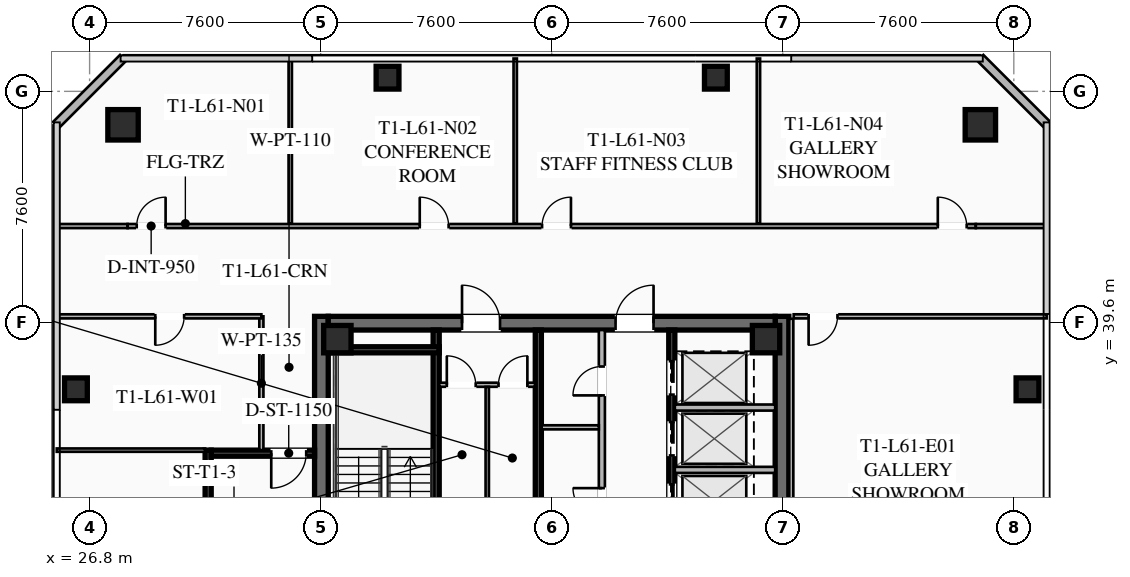
"""IFC4 building model, lengths in metres.
Left out: names, types, materials, properties, quantities, classifications, styles, units other than length and angle.
Written with IfcOpenShell. Run it as: python <this file> out.ifc"""

import sys

from ifc_helpers import new_model, si_unit, direction, frame, frame_2d, origin, origin_2d, place, context, subcontext, project, spatial, rectangle, hollow_rectangle, extrude, element, fill, save


model = new_model("IFC4")
c1 = context("Model", 3, precision=1e-05, world=origin(), true_north=direction((0.0, 1.0)))
c2 = subcontext(c1, "Body", "Model", "MODEL_VIEW")
j1 = project(units=[si_unit("LENGTHUNIT", "METRE"), si_unit("PLANEANGLEUNIT", "RADIAN")], contexts=[c1])
p1 = place(None, origin())
s1 = spatial("IfcSite", under=j1, at=p1, CompositionType="ELEMENT")
p2 = place(p1, origin())
s2 = spatial("IfcBuilding", under=s1, at=p2, CompositionType="ELEMENT")
p3 = place(p2, frame((0.0, 0.0, 225.5)))
s3 = spatial("IfcBuildingStorey", under=s2, at=p3, CompositionType="ELEMENT", Elevation=225.5)
for number, where, z_axis, x_axis in (
    (1, (34.425, 24.2, 0.0), (0.0, 0.0, 1.0), (0.0, 1.0, 0.0)),
    (2, (49.575, 39.8, 0.0), (0.0, 0.0, 1.0), (0.0, -1.0, 0.0)),
):
    element("IfcWall", number, at=place(p3, frame(where, z_axis=z_axis, x_axis=x_axis)), inside=s3, PredefinedType="SHEAR", context=c2, shape_type="SweptSolid", body=[
        extrude(rectangle(XDim=15.6, YDim=0.45, at=frame_2d((7.8, 0.0))), origin(), (0.0, 0.0, 1.0), 3.55),
    ])
p4 = place(p3, frame((34.65, 39.575, 0.0), z_axis=(0.0, 0.0, 1.0), x_axis=(1.0, 0.0, 0.0)))
e3 = element("IfcWall", 3, at=p4, inside=s3, PredefinedType="SHEAR", context=c2, shape_type="SweptSolid", body=[
    extrude(rectangle(XDim=14.7, YDim=0.45, at=frame_2d((7.35, 0.0))), origin(), (0.0, 0.0, 1.0), 3.55),
])
p5 = place(p4, frame((4.4, 0.0, 0.0)))
e4 = element("IfcOpeningElement", 4, at=p5, cuts=e3, PredefinedType="OPENING", context=c2, shape_type="SweptSolid", body=[
    extrude(rectangle(XDim=1.25, YDim=2.25, at=frame_2d((0.625, 1.125))), frame((0.0, 0.235, 0.0), z_axis=(0.0, -1.0, 0.0), x_axis=(1.0, 0.0, 0.0)), (0.0, 0.0, 1.0), 0.47),
])
p6 = place(p4, frame((9.45, 0.0, 0.0)))
e5 = element("IfcOpeningElement", 5, at=p6, cuts=e3, PredefinedType="OPENING", context=c2, shape_type="SweptSolid", body=[
    extrude(rectangle(XDim=1.25, YDim=2.25, at=frame_2d((0.625, 1.125))), frame((0.0, 0.235, 0.0), z_axis=(0.0, -1.0, 0.0), x_axis=(1.0, 0.0, 0.0)), (0.0, 0.0, 1.0), 0.47),
])
for number, where, z_axis, x_axis in (
    (6, (49.05, 39.05, 0.0), (0.0, 0.0, 1.0), (1.0, 0.0, 0.0)),
    (7, (34.95, 39.05, 0.0), (0.0, 0.0, 1.0), (1.0, 0.0, 0.0)),
):
    element("IfcColumn", number, at=place(p3, frame(where, z_axis=z_axis, x_axis=x_axis)), inside=s3, PredefinedType="COLUMN", context=c2, shape_type="SweptSolid", body=[
        extrude(hollow_rectangle(XDim=0.9, YDim=0.9, WallThickness=0.04, at=origin_2d()), origin(), (0.0, 0.0, 1.0), 3.37),
    ])
for number, where, z_axis, x_axis in (
    (8, (56.1, 46.1, 0.0), (0.0, 0.0, 1.0), (1.0, 0.0, 0.0)),
    (9, (27.9, 46.1, 0.0), (0.0, 0.0, 1.0), (1.0, 0.0, 0.0)),
):
    element("IfcColumn", number, at=place(p3, frame(where, z_axis=z_axis, x_axis=x_axis)), inside=s3, PredefinedType="COLUMN", context=c2, shape_type="SweptSolid", body=[
        extrude(hollow_rectangle(XDim=1.0, YDim=1.0, WallThickness=0.04, at=origin_2d()), origin(), (0.0, 0.0, 1.0), 3.37),
    ])
for number, where, z_axis, x_axis in (
    (10, (57.65, 37.4, 0.0), (0.0, 0.0, 1.0), (1.0, 0.0, 0.0)),
    (11, (47.4, 47.65, 0.0), (0.0, 0.0, 1.0), (1.0, 0.0, 0.0)),
    (12, (36.6, 47.65, 0.0), (0.0, 0.0, 1.0), (1.0, 0.0, 0.0)),
    (13, (26.35, 37.4, 0.0), (0.0, 0.0, 1.0), (1.0, 0.0, 0.0)),
):
    element("IfcColumn", number, at=place(p3, frame(where, z_axis=z_axis, x_axis=x_axis)), inside=s3, PredefinedType="COLUMN", context=c2, shape_type="SweptSolid", body=[
        extrude(hollow_rectangle(XDim=0.75, YDim=0.75, WallThickness=0.032, at=origin_2d()), origin(), (0.0, 0.0, 1.0), 3.37),
    ])
for number, where, z_axis, x_axis in (
    (14, (25.7, 46.1, 0.0), (0.0, 0.0, 1.0), (0.707, 0.707, 0.0)),
    (15, (56.1, 48.3, 0.0), (0.0, 0.0, 1.0), (0.707, -0.707, 0.0)),
):
    element("IfcWall", number, at=place(p3, frame(where, z_axis=z_axis, x_axis=x_axis)), inside=s3, PredefinedType="SOLIDWALL", context=c2, shape_type="SweptSolid", body=[
        extrude(rectangle(XDim=3.111, YDim=0.28, at=frame_2d((1.556, 0.0))), origin(), (0.0, 0.0, 1.0), 3.37),
    ])
p7 = place(p3, frame((38.2, 31.2, 0.0), z_axis=(0.0, 0.0, 1.0), x_axis=(0.0, 1.0, 0.0)))
e16 = element("IfcWall", 16, at=p7, inside=s3, PredefinedType="SHEAR", context=c2, shape_type="SweptSolid", body=[
    extrude(rectangle(XDim=8.15, YDim=0.2, at=frame_2d((4.075, 0.0))), origin(), (0.0, 0.0, 1.0), 3.37),
])
p8 = place(p7, frame((0.45, 0.0, 0.0)))
e17 = element("IfcOpeningElement", 17, at=p8, cuts=e16, PredefinedType="OPENING", context=c2, shape_type="SweptSolid", body=[
    extrude(rectangle(XDim=1.15, YDim=2.2, at=frame_2d((0.575, 1.1))), frame((0.0, 0.11, 0.0), z_axis=(0.0, -1.0, 0.0), x_axis=(1.0, 0.0, 0.0)), (0.0, 0.0, 1.0), 0.22),
])
p9 = place(p3, frame((34.65, 38.7, 0.0), z_axis=(0.0, 0.0, 1.0), x_axis=(1.0, 0.0, 0.0)))
e18 = element("IfcWall", 18, at=p9, inside=s3, PredefinedType="SHEAR", context=c2, shape_type="SweptSolid", body=[
    extrude(rectangle(XDim=3.65, YDim=0.2, at=frame_2d((1.825, 0.0))), origin(), (0.0, 0.0, 1.0), 3.37),
])
p10 = place(p3, frame((41.56, 24.65, 0.0), z_axis=(0.0, 0.0, 1.0), x_axis=(0.0, 1.0, 0.0)))
e19 = element("IfcWall", 19, at=p10, inside=s3, PredefinedType="SHEAR", context=c2, shape_type="SweptSolid", body=[
    extrude(rectangle(XDim=14.7, YDim=0.2, at=frame_2d((7.35, 0.0))), origin(), (0.0, 0.0, 1.0), 3.37),
])
p11 = place(p3, frame((45.95, 39.35, 0.0), z_axis=(0.0, 0.0, 1.0), x_axis=(0.0, -1.0, 0.0)))
e20 = element("IfcWall", 20, at=p11, inside=s3, PredefinedType="SHEAR", context=c2, shape_type="SweptSolid", body=[
    extrude(rectangle(XDim=6.55, YDim=0.2, at=frame_2d((3.275, 0.0))), origin(), (0.0, 0.0, 1.0), 3.37),
])
p12 = place(p11, frame((5.075, 0.0, 0.0)))
e21 = element("IfcOpeningElement", 21, at=p12, cuts=e20, PredefinedType="OPENING", context=c2, shape_type="SweptSolid", body=[
    extrude(rectangle(XDim=1.1, YDim=2.2, at=frame_2d((0.55, 1.1))), frame((0.0, 0.11, 0.0), z_axis=(0.0, -1.0, 0.0), x_axis=(1.0, 0.0, 0.0)), (0.0, 0.0, 1.0), 0.22),
])
p13 = place(p11, frame((3.025, 0.0, 0.0)))
e22 = element("IfcOpeningElement", 22, at=p13, cuts=e20, PredefinedType="OPENING", context=c2, shape_type="SweptSolid", body=[
    extrude(rectangle(XDim=1.1, YDim=2.2, at=frame_2d((0.55, 1.1))), frame((0.0, 0.11, 0.0), z_axis=(0.0, -1.0, 0.0), x_axis=(1.0, 0.0, 0.0)), (0.0, 0.0, 1.0), 0.22),
])
p14 = place(p11, frame((1.025, 0.0, 0.0)))
e23 = element("IfcOpeningElement", 23, at=p14, cuts=e20, PredefinedType="OPENING", context=c2, shape_type="SweptSolid", body=[
    extrude(rectangle(XDim=1.1, YDim=2.2, at=frame_2d((0.55, 1.1))), frame((0.0, 0.11, 0.0), z_axis=(0.0, -1.0, 0.0), x_axis=(1.0, 0.0, 0.0)), (0.0, 0.0, 1.0), 0.22),
])
for number, where, z_axis, x_axis in (
    (24, (46.05, 34.75, 0.0), (0.0, 0.0, 1.0), (1.0, 0.0, 0.0)),
    (25, (46.05, 36.8, 0.0), (0.0, 0.0, 1.0), (1.0, 0.0, 0.0)),
):
    element("IfcWall", number, at=place(p3, frame(where, z_axis=z_axis, x_axis=x_axis)), inside=s3, PredefinedType="SOLIDWALL", context=c2, shape_type="SweptSolid", body=[
        extrude(rectangle(XDim=3.3, YDim=0.2, at=frame_2d((1.65, 0.0))), origin(), (0.0, 0.0, 1.0), 3.37),
    ])
p15 = place(p3, frame((38.3, 37.55, 0.0), z_axis=(0.0, 0.0, 1.0), x_axis=(1.0, 0.0, 0.0)))
e26 = element("IfcWall", 26, at=p15, inside=s3, PredefinedType="PARTITIONING", context=c2, shape_type="SweptSolid", body=[
    extrude(rectangle(XDim=3.15, YDim=0.135, at=frame_2d((1.575, 0.0))), origin(), (0.0, 0.0, 1.0), 2.723),
])
p16 = place(p15, frame((0.25, 0.0, 0.0)))
e27 = element("IfcOpeningElement", 27, at=p16, cuts=e26, PredefinedType="OPENING", context=c2, shape_type="SweptSolid", body=[
    extrude(rectangle(XDim=0.95, YDim=2.05, at=frame_2d((0.475, 1.025))), frame((0.0, 0.077, 0.0), z_axis=(0.0, -1.0, 0.0), x_axis=(1.0, 0.0, 0.0)), (0.0, 0.0, 1.0), 0.155),
])
p17 = place(p15, frame((1.95, 0.0, 0.0)))
e28 = element("IfcOpeningElement", 28, at=p17, cuts=e26, PredefinedType="OPENING", context=c2, shape_type="SweptSolid", body=[
    extrude(rectangle(XDim=0.95, YDim=2.05, at=frame_2d((0.475, 1.025))), frame((0.0, 0.077, 0.0), z_axis=(0.0, -1.0, 0.0), x_axis=(1.0, 0.0, 0.0)), (0.0, 0.0, 1.0), 0.155),
])
p18 = place(p3, frame((39.88, 33.68, 0.0), z_axis=(0.0, 0.0, 1.0), x_axis=(0.0, 1.0, 0.0)))
e29 = element("IfcWall", 29, at=p18, inside=s3, PredefinedType="PARTITIONING", context=c2, shape_type="SweptSolid", body=[
    extrude(rectangle(XDim=3.8, YDim=0.11, at=frame_2d((1.9, 0.0))), origin(), (0.0, 0.0, 1.0), 2.723),
])
p19 = place(p3, frame((43.65, 32.35, 0.0), z_axis=(0.0, 0.0, 1.0), x_axis=(0.0, 1.0, 0.0)))
e30 = element("IfcWall", 30, at=p19, inside=s3, PredefinedType="SOLIDWALL", context=c2, shape_type="SweptSolid", body=[
    extrude(rectangle(XDim=7.0, YDim=0.2, at=frame_2d((3.5, 0.0))), origin(), (0.0, 0.0, 1.0), 2.723),
])
p20 = place(p19, frame((0.85, 0.0, 0.0)))
e31 = element("IfcOpeningElement", 31, at=p20, cuts=e30, PredefinedType="OPENING", context=c2, shape_type="SweptSolid", body=[
    extrude(rectangle(XDim=0.95, YDim=2.05, at=frame_2d((0.475, 1.025))), frame((0.0, 0.11, 0.0), z_axis=(0.0, -1.0, 0.0), x_axis=(1.0, 0.0, 0.0)), (0.0, 0.0, 1.0), 0.22),
])
p21 = place(p19, frame((4.85, 0.0, 0.0)))
e32 = element("IfcOpeningElement", 32, at=p21, cuts=e30, PredefinedType="OPENING", context=c2, shape_type="SweptSolid", body=[
    extrude(rectangle(XDim=0.95, YDim=2.05, at=frame_2d((0.475, 1.025))), frame((0.0, 0.11, 0.0), z_axis=(0.0, -1.0, 0.0), x_axis=(1.0, 0.0, 0.0)), (0.0, 0.0, 1.0), 0.22),
])
p22 = place(p3, frame((41.67, 36.15, 0.0), z_axis=(0.0, 0.0, 1.0), x_axis=(1.0, 0.0, 0.0)))
e33 = element("IfcWall", 33, at=p22, inside=s3, PredefinedType="PARTITIONING", context=c2, shape_type="SweptSolid", body=[
    extrude(rectangle(XDim=1.88, YDim=0.135, at=frame_2d((0.94, 0.0))), origin(), (0.0, 0.0, 1.0), 2.723),
])
p23 = place(p3, frame((30.7, 28.6, 0.0), z_axis=(0.0, 0.0, 1.0), x_axis=(0.0, 1.0, 0.0)))
e34 = element("IfcWall", 34, at=p23, inside=s3, PredefinedType="SHEAR", context=c2, shape_type="SweptSolid", body=[
    extrude(rectangle(XDim=6.8, YDim=0.2, at=frame_2d((3.4, 0.0))), origin(), (0.0, 0.0, 1.0), 3.37),
])
p24 = place(p3, frame((34.2, 35.3, 0.0), z_axis=(0.0, 0.0, 1.0), x_axis=(-1.0, 0.0, 0.0)))
e35 = element("IfcWall", 35, at=p24, inside=s3, PredefinedType="SHEAR", context=c2, shape_type="SweptSolid", body=[
    extrude(rectangle(XDim=3.4, YDim=0.2, at=frame_2d((1.7, 0.0))), origin(), (0.0, 0.0, 1.0), 3.37),
])
p25 = place(p24, frame((0.275, 0.0, 0.0)))
e36 = element("IfcOpeningElement", 36, at=p25, cuts=e35, PredefinedType="OPENING", context=c2, shape_type="SweptSolid", body=[
    extrude(rectangle(XDim=1.15, YDim=2.2, at=frame_2d((0.575, 1.1))), frame((0.0, 0.11, 0.0), z_axis=(0.0, -1.0, 0.0), x_axis=(1.0, 0.0, 0.0)), (0.0, 0.0, 1.0), 0.22),
])
p26 = place(p3, frame((32.45, 35.4, 0.0), z_axis=(0.0, 0.0, 1.0), x_axis=(0.0, 1.0, 0.0)))
e37 = element("IfcWall", 37, at=p26, inside=s3, PredefinedType="PARTITIONING", context=c2, shape_type="SweptSolid", body=[
    extrude(rectangle(XDim=4.4, YDim=0.135, at=frame_2d((2.2, 0.0))), origin(), (0.0, 0.0, 1.0), 2.723),
])
p27 = place(p3, frame((28.05, 42.77, 0.0), z_axis=(0.0, 0.0, 1.0), x_axis=(1.0, 0.0, 0.0)))
e38 = element("IfcWall", 38, at=p27, inside=s3, PredefinedType="PARTITIONING", context=c2, shape_type="SweptSolid", body=[
    extrude(rectangle(XDim=27.9, YDim=0.135, at=frame_2d((13.95, 0.0))), origin(), (0.0, 0.0, 1.0), 2.723),
])
p28 = place(p27, frame((0.3, 0.0, 0.0)))
e39 = element("IfcOpeningElement", 39, at=p28, cuts=e38, PredefinedType="OPENING", context=c2, shape_type="SweptSolid", body=[
    extrude(rectangle(XDim=0.95, YDim=2.05, at=frame_2d((0.475, 1.025))), frame((0.0, 0.077, 0.0), z_axis=(0.0, -1.0, 0.0), x_axis=(1.0, 0.0, 0.0)), (0.0, 0.0, 1.0), 0.155),
])
p29 = place(p27, frame((9.61, 0.0, 0.0)))
e40 = element("IfcOpeningElement", 40, at=p29, cuts=e38, PredefinedType="OPENING", context=c2, shape_type="SweptSolid", body=[
    extrude(rectangle(XDim=0.95, YDim=2.05, at=frame_2d((0.475, 1.025))), frame((0.0, 0.077, 0.0), z_axis=(0.0, -1.0, 0.0), x_axis=(1.0, 0.0, 0.0)), (0.0, 0.0, 1.0), 0.155),
])
p30 = place(p27, frame((13.633, 0.0, 0.0)))
e41 = element("IfcOpeningElement", 41, at=p30, cuts=e38, PredefinedType="OPENING", context=c2, shape_type="SweptSolid", body=[
    extrude(rectangle(XDim=0.95, YDim=2.05, at=frame_2d((0.475, 1.025))), frame((0.0, 0.077, 0.0), z_axis=(0.0, -1.0, 0.0), x_axis=(1.0, 0.0, 0.0)), (0.0, 0.0, 1.0), 0.155),
])
p31 = place(p27, frame((26.65, 0.0, 0.0)))
e42 = element("IfcOpeningElement", 42, at=p31, cuts=e38, PredefinedType="OPENING", context=c2, shape_type="SweptSolid", body=[
    extrude(rectangle(XDim=0.95, YDim=2.05, at=frame_2d((0.475, 1.025))), frame((0.0, 0.077, 0.0), z_axis=(0.0, -1.0, 0.0), x_axis=(1.0, 0.0, 0.0)), (0.0, 0.0, 1.0), 0.155),
])
for number, where, z_axis, x_axis in (
    (43, (25.72, 42.77, 0.0), (0.0, 0.0, 1.0), (1.0, 0.0, 0.0)),
    (44, (55.95, 42.77, 0.0), (0.0, 0.0, 1.0), (1.0, 0.0, 0.0)),
):
    element("IfcWall", number, at=place(p3, frame(where, z_axis=z_axis, x_axis=x_axis)), inside=s3, PredefinedType="PARTITIONING", context=c2, shape_type="SweptSolid", body=[
        extrude(rectangle(XDim=2.33, YDim=0.135, at=frame_2d((1.165, 0.0))), origin(), (0.0, 0.0, 1.0), 2.723),
    ])
for number, where, z_axis, x_axis in (
    (45, (33.4, 42.85, 0.0), (0.0, 0.0, 1.0), (0.0, 1.0, 0.0)),
    (46, (40.8, 42.85, 0.0), (0.0, 0.0, 1.0), (0.0, 1.0, 0.0)),
    (47, (48.8, 42.85, 0.0), (0.0, 0.0, 1.0), (0.0, 1.0, 0.0)),
):
    element("IfcWall", number, at=place(p3, frame(where, z_axis=z_axis, x_axis=x_axis)), inside=s3, PredefinedType="PARTITIONING", context=c2, shape_type="SweptSolid", body=[
        extrude(rectangle(XDim=5.43, YDim=0.11, at=frame_2d((2.715, 0.0))), origin(), (0.0, 0.0, 1.0), 2.723),
    ])
p32 = place(p3, frame((49.88, 39.72, 0.0), z_axis=(0.0, 0.0, 1.0), x_axis=(0.0, -1.0, 0.0)))
e48 = element("IfcWall", 48, at=p32, inside=s3, PredefinedType="PARTITIONING", context=c2, shape_type="SweptSolid", body=[
    extrude(rectangle(XDim=15.44, YDim=0.135, at=frame_2d((7.72, 0.0))), origin(), (0.0, 0.0, 1.0), 2.723),
])
p33 = place(p3, frame((58.28, 39.8, 0.0), z_axis=(0.0, 0.0, 1.0), x_axis=(-1.0, 0.0, 0.0)))
e49 = element("IfcWall", 49, at=p33, inside=s3, PredefinedType="PARTITIONING", context=c2, shape_type="SweptSolid", body=[
    extrude(rectangle(XDim=8.32, YDim=0.135, at=frame_2d((4.16, 0.0))), origin(), (0.0, 0.0, 1.0), 2.723),
])
p34 = place(p33, frame((6.88, 0.0, 0.0)))
e50 = element("IfcOpeningElement", 50, at=p34, cuts=e49, PredefinedType="OPENING", context=c2, shape_type="SweptSolid", body=[
    extrude(rectangle(XDim=0.95, YDim=2.05, at=frame_2d((0.475, 1.025))), frame((0.0, 0.077, 0.0), z_axis=(0.0, -1.0, 0.0), x_axis=(1.0, 0.0, 0.0)), (0.0, 0.0, 1.0), 0.155),
])
p35 = place(p3, frame((32.45, 39.8, 0.0), z_axis=(0.0, 0.0, 1.0), x_axis=(-1.0, 0.0, 0.0)))
e51 = element("IfcWall", 51, at=p35, inside=s3, PredefinedType="PARTITIONING", context=c2, shape_type="SweptSolid", body=[
    extrude(rectangle(XDim=6.73, YDim=0.135, at=frame_2d((3.365, 0.0))), origin(), (0.0, 0.0, 1.0), 2.723),
])
p36 = place(p35, frame((2.54, 0.0, 0.0)))
e52 = element("IfcOpeningElement", 52, at=p36, cuts=e51, PredefinedType="OPENING", context=c2, shape_type="SweptSolid", body=[
    extrude(rectangle(XDim=0.95, YDim=2.05, at=frame_2d((0.475, 1.025))), frame((0.0, 0.077, 0.0), z_axis=(0.0, -1.0, 0.0), x_axis=(1.0, 0.0, 0.0)), (0.0, 0.0, 1.0), 0.155),
])
p37 = place(p3, frame((30.6, 35.4, 0.0), z_axis=(0.0, 0.0, 1.0), x_axis=(-1.0, 0.0, 0.0)))
e53 = element("IfcWall", 53, at=p37, inside=s3, PredefinedType="PARTITIONING", context=c2, shape_type="SweptSolid", body=[
    extrude(rectangle(XDim=4.88, YDim=0.11, at=frame_2d((2.44, 0.0))), origin(), (0.0, 0.0, 1.0), 2.723),
])
p38 = place(p5, origin())
e54 = element("IfcDoor", 54, at=p38, inside=s3, OperationType="SINGLE_SWING_LEFT", PredefinedType="DOOR", context=c2, shape_type="SweptSolid", body=[
    extrude(rectangle(XDim=1.25, YDim=2.25, at=frame_2d((0.625, 1.125))), frame((0.0, 0.025, 0.0), z_axis=(0.0, -1.0, 0.0), x_axis=(1.0, 0.0, 0.0)), (0.0, 0.0, 1.0), 0.05),
])
fill(e4, e54)
p39 = place(p6, origin())
e55 = element("IfcDoor", 55, at=p39, inside=s3, OperationType="SINGLE_SWING_RIGHT", PredefinedType="DOOR", context=c2, shape_type="SweptSolid", body=[
    extrude(rectangle(XDim=1.25, YDim=2.25, at=frame_2d((0.625, 1.125))), frame((0.0, 0.025, 0.0), z_axis=(0.0, -1.0, 0.0), x_axis=(1.0, 0.0, 0.0)), (0.0, 0.0, 1.0), 0.05),
])
fill(e5, e55)
p40 = place(p16, origin())
e56 = element("IfcDoor", 56, at=p40, inside=s3, OperationType="SINGLE_SWING_LEFT", PredefinedType="DOOR", context=c2, shape_type="SweptSolid", body=[
    extrude(rectangle(XDim=0.95, YDim=2.05, at=frame_2d((0.475, 1.025))), frame((0.0, 0.025, 0.0), z_axis=(0.0, -1.0, 0.0), x_axis=(1.0, 0.0, 0.0)), (0.0, 0.0, 1.0), 0.05),
])
fill(e27, e56)
p41 = place(p17, origin())
e57 = element("IfcDoor", 57, at=p41, inside=s3, OperationType="SINGLE_SWING_RIGHT", PredefinedType="DOOR", context=c2, shape_type="SweptSolid", body=[
    extrude(rectangle(XDim=0.95, YDim=2.05, at=frame_2d((0.475, 1.025))), frame((0.0, 0.025, 0.0), z_axis=(0.0, -1.0, 0.0), x_axis=(1.0, 0.0, 0.0)), (0.0, 0.0, 1.0), 0.05),
])
fill(e28, e57)
p42 = place(p20, origin())
e58 = element("IfcDoor", 58, at=p42, inside=s3, OperationType="SINGLE_SWING_RIGHT", PredefinedType="DOOR", context=c2, shape_type="SweptSolid", body=[
    extrude(rectangle(XDim=0.95, YDim=2.05, at=frame_2d((0.475, 1.025))), frame((0.0, 0.025, 0.0), z_axis=(0.0, -1.0, 0.0), x_axis=(1.0, 0.0, 0.0)), (0.0, 0.0, 1.0), 0.05),
])
fill(e31, e58)
p43 = place(p21, origin())
e59 = element("IfcDoor", 59, at=p43, inside=s3, OperationType="SINGLE_SWING_LEFT", PredefinedType="DOOR", context=c2, shape_type="SweptSolid", body=[
    extrude(rectangle(XDim=0.95, YDim=2.05, at=frame_2d((0.475, 1.025))), frame((0.0, 0.025, 0.0), z_axis=(0.0, -1.0, 0.0), x_axis=(1.0, 0.0, 0.0)), (0.0, 0.0, 1.0), 0.05),
])
fill(e32, e59)
p44 = place(p25, origin())
e60 = element("IfcDoor", 60, at=p44, inside=s3, OperationType="SINGLE_SWING_RIGHT", PredefinedType="DOOR", context=c2, shape_type="SweptSolid", body=[
    extrude(rectangle(XDim=1.15, YDim=2.2, at=frame_2d((0.575, 1.1))), frame((0.0, 0.025, 0.0), z_axis=(0.0, -1.0, 0.0), x_axis=(1.0, 0.0, 0.0)), (0.0, 0.0, 1.0), 0.05),
])
fill(e36, e60)
p45 = place(p28, origin())
e61 = element("IfcDoor", 61, at=p45, inside=s3, OperationType="SINGLE_SWING_RIGHT", PredefinedType="DOOR", context=c2, shape_type="SweptSolid", body=[
    extrude(rectangle(XDim=0.95, YDim=2.05, at=frame_2d((0.475, 1.025))), frame((0.0, 0.025, 0.0), z_axis=(0.0, -1.0, 0.0), x_axis=(1.0, 0.0, 0.0)), (0.0, 0.0, 1.0), 0.05),
])
fill(e39, e61)
p46 = place(p29, origin())
e62 = element("IfcDoor", 62, at=p46, inside=s3, OperationType="SINGLE_SWING_LEFT", PredefinedType="DOOR", context=c2, shape_type="SweptSolid", body=[
    extrude(rectangle(XDim=0.95, YDim=2.05, at=frame_2d((0.475, 1.025))), frame((0.0, 0.025, 0.0), z_axis=(0.0, -1.0, 0.0), x_axis=(1.0, 0.0, 0.0)), (0.0, 0.0, 1.0), 0.05),
])
fill(e40, e62)
p47 = place(p30, origin())
e63 = element("IfcDoor", 63, at=p47, inside=s3, OperationType="SINGLE_SWING_RIGHT", PredefinedType="DOOR", context=c2, shape_type="SweptSolid", body=[
    extrude(rectangle(XDim=0.95, YDim=2.05, at=frame_2d((0.475, 1.025))), frame((0.0, 0.025, 0.0), z_axis=(0.0, -1.0, 0.0), x_axis=(1.0, 0.0, 0.0)), (0.0, 0.0, 1.0), 0.05),
])
fill(e41, e63)
p48 = place(p31, origin())
e64 = element("IfcDoor", 64, at=p48, inside=s3, OperationType="SINGLE_SWING_LEFT", PredefinedType="DOOR", context=c2, shape_type="SweptSolid", body=[
    extrude(rectangle(XDim=0.95, YDim=2.05, at=frame_2d((0.475, 1.025))), frame((0.0, 0.025, 0.0), z_axis=(0.0, -1.0, 0.0), x_axis=(1.0, 0.0, 0.0)), (0.0, 0.0, 1.0), 0.05),
])
fill(e42, e64)
p49 = place(p34, origin())
e65 = element("IfcDoor", 65, at=p49, inside=s3, OperationType="SINGLE_SWING_RIGHT", PredefinedType="DOOR", context=c2, shape_type="SweptSolid", body=[
    extrude(rectangle(XDim=0.95, YDim=2.05, at=frame_2d((0.475, 1.025))), frame((0.0, 0.025, 0.0), z_axis=(0.0, -1.0, 0.0), x_axis=(1.0, 0.0, 0.0)), (0.0, 0.0, 1.0), 0.05),
])
fill(e50, e65)
p50 = place(p36, origin())
e66 = element("IfcDoor", 66, at=p50, inside=s3, OperationType="SINGLE_SWING_RIGHT", PredefinedType="DOOR", context=c2, shape_type="SweptSolid", body=[
    extrude(rectangle(XDim=0.95, YDim=2.05, at=frame_2d((0.475, 1.025))), frame((0.0, 0.025, 0.0), z_axis=(0.0, -1.0, 0.0), x_axis=(1.0, 0.0, 0.0)), (0.0, 0.0, 1.0), 0.05),
])
fill(e52, e66)
p51 = place(p12, origin())
e67 = element("IfcDoor", 67, at=p51, inside=s3, OperationType="SLIDING_TO_LEFT", PredefinedType="DOOR", context=c2, shape_type="SweptSolid", body=[
    extrude(rectangle(XDim=1.1, YDim=2.2, at=frame_2d((0.55, 1.1))), frame((0.0, 0.025, 0.0), z_axis=(0.0, -1.0, 0.0), x_axis=(1.0, 0.0, 0.0)), (0.0, 0.0, 1.0), 0.05),
])
fill(e21, e67)
p52 = place(p13, origin())
e68 = element("IfcDoor", 68, at=p52, inside=s3, OperationType="SLIDING_TO_LEFT", PredefinedType="DOOR", context=c2, shape_type="SweptSolid", body=[
    extrude(rectangle(XDim=1.1, YDim=2.2, at=frame_2d((0.55, 1.1))), frame((0.0, 0.025, 0.0), z_axis=(0.0, -1.0, 0.0), x_axis=(1.0, 0.0, 0.0)), (0.0, 0.0, 1.0), 0.05),
])
fill(e22, e68)
p53 = place(p14, origin())
e69 = element("IfcDoor", 69, at=p53, inside=s3, OperationType="SLIDING_TO_LEFT", PredefinedType="DOOR", context=c2, shape_type="SweptSolid", body=[
    extrude(rectangle(XDim=1.1, YDim=2.2, at=frame_2d((0.55, 1.1))), frame((0.0, 0.025, 0.0), z_axis=(0.0, -1.0, 0.0), x_axis=(1.0, 0.0, 0.0)), (0.0, 0.0, 1.0), 0.05),
])
fill(e23, e69)
save(model, sys.argv[1])
